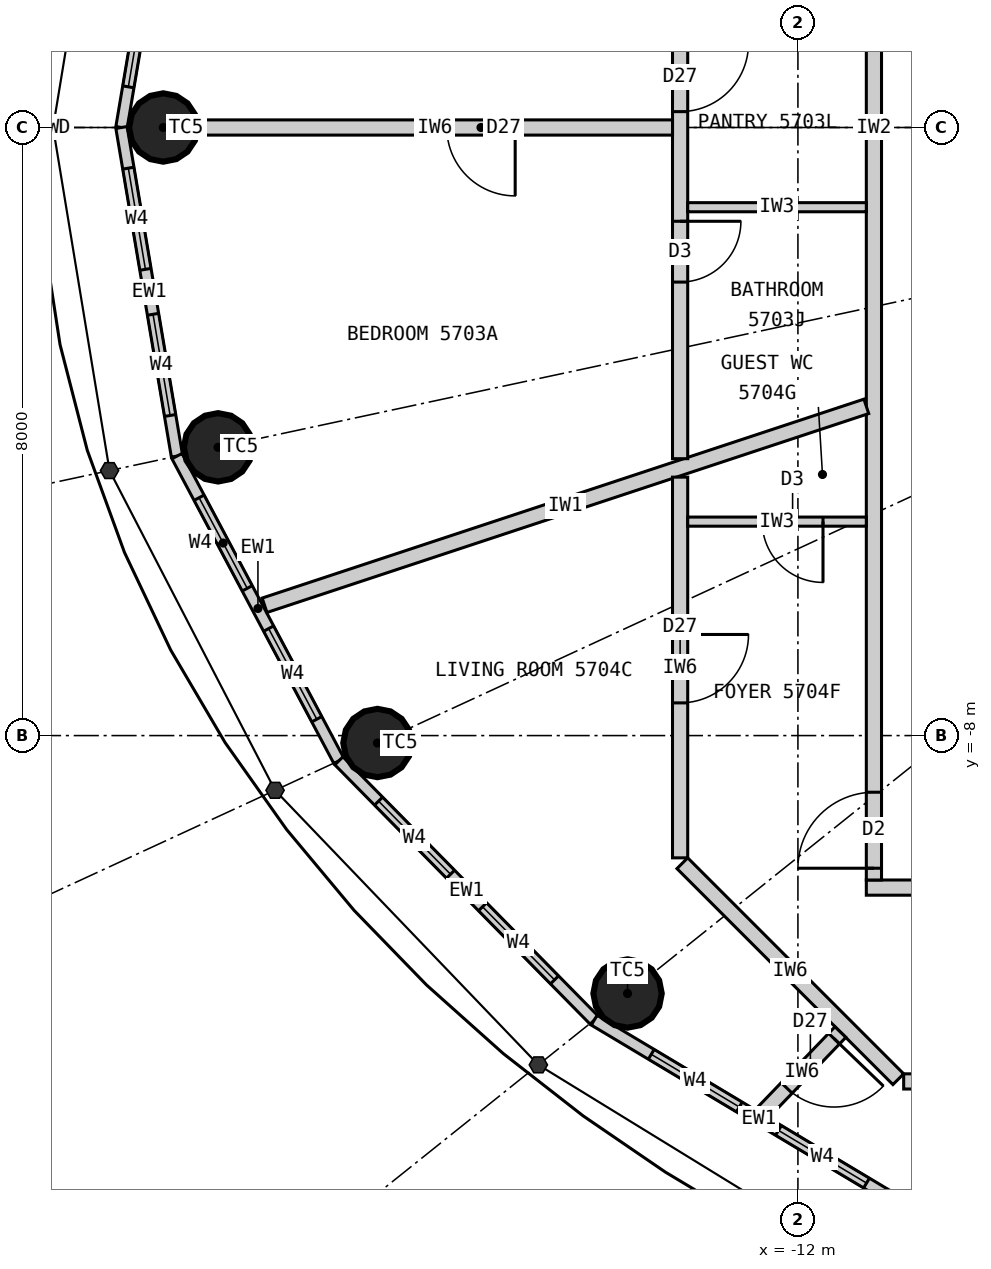
"""IFC4 building model, lengths in metres.
Left out: names, types, materials, properties, quantities, classifications, styles, units other than length and angle.
Written with IfcOpenShell. Run it as: python <this file> out.ifc"""

import sys

from ifc_helpers import new_model, si_unit, direction, frame, frame_2d, origin, origin_2d, place, context, subcontext, project, spatial, rectangle, circle, extrude, element, fill, save


model = new_model("IFC4")
c1 = context("Model", 3, precision=1e-05, world=origin(), true_north=direction((0.0, 1.0)))
c2 = subcontext(c1, "Body", "Model", "MODEL_VIEW")
j1 = project(units=[si_unit("LENGTHUNIT", "METRE"), si_unit("PLANEANGLEUNIT", "RADIAN")], contexts=[c1])
p1 = place(None, origin())
s1 = spatial("IfcSite", under=j1, at=p1, CompositionType="ELEMENT")
p2 = place(p1, origin())
s2 = spatial("IfcBuilding", under=s1, at=p2, CompositionType="ELEMENT")
p3 = place(p2, frame((0.0, 0.0, 212.7)))
s3 = spatial("IfcBuildingStorey", under=s2, at=p3, CompositionType="ELEMENT", Elevation=212.7)
for number, where, z_axis, x_axis in (
    (1, (-20.35, 0.0, 0.0), (0.0, 0.0, 1.0), (1.0, 0.0, 0.0)),
    (2, (-19.629, -4.208, 0.0), (0.0, 0.0, 1.0), (1.0, 0.0, 0.0)),
    (3, (-17.532, -8.098, 0.0), (0.0, 0.0, 1.0), (1.0, 0.0, 0.0)),
    (4, (-14.241, -11.393, 0.0), (0.0, 0.0, 1.0), (1.0, 0.0, 0.0)),
):
    element("IfcColumn", number, at=place(p3, frame(where, z_axis=z_axis, x_axis=x_axis)), inside=s3, PredefinedType="COLUMN", context=c2, shape_type="SweptSolid", body=[
        extrude(circle(Radius=0.45, at=origin_2d()), origin(), (0.0, 0.0, 1.0), 3.3),
    ])
p4 = place(p3, frame((-20.17, 4.323, 0.0), z_axis=(0.0, 0.0, 1.0), x_axis=(-0.166538513568, -0.986034950445, 0.0)))
e5 = element("IfcWall", 5, at=p4, inside=s3, PredefinedType="ELEMENTEDWALL", context=c2, shape_type="SweptSolid", body=[
    extrude(rectangle(XDim=4.385, YDim=0.15, at=frame_2d((2.192, 0.0))), origin(), (0.0, 0.0, 1.0), 3.12),
])
p5 = place(p4, frame((0.542, 0.0, 0.9)))
e6 = element("IfcOpeningElement", 6, at=p5, cuts=e5, PredefinedType="OPENING", context=c2, shape_type="SweptSolid", body=[
    extrude(rectangle(XDim=1.35, YDim=1.9, at=frame_2d((0.675, 0.95))), frame((0.0, 0.085, 0.0), z_axis=(0.0, -1.0, 0.0), x_axis=(1.0, 0.0, 0.0)), (0.0, 0.0, 1.0), 0.17),
])
p6 = place(p4, frame((2.492, 0.0, 0.9)))
e7 = element("IfcOpeningElement", 7, at=p6, cuts=e5, PredefinedType="OPENING", context=c2, shape_type="SweptSolid", body=[
    extrude(rectangle(XDim=1.35, YDim=1.9, at=frame_2d((0.675, 0.95))), frame((0.0, 0.085, 0.0), z_axis=(0.0, -1.0, 0.0), x_axis=(1.0, 0.0, 0.0)), (0.0, 0.0, 1.0), 0.17),
])
p7 = place(p3, frame((-20.9, 0.0, 0.0), z_axis=(0.0, 0.0, 1.0), x_axis=(0.166538513568, -0.986034950445, 0.0)))
e8 = element("IfcWall", 8, at=p7, inside=s3, PredefinedType="ELEMENTEDWALL", context=c2, shape_type="SweptSolid", body=[
    extrude(rectangle(XDim=4.385, YDim=0.15, at=frame_2d((2.192, 0.0))), origin(), (0.0, 0.0, 1.0), 3.12),
])
p8 = place(p7, frame((0.542, 0.0, 0.9)))
e9 = element("IfcOpeningElement", 9, at=p8, cuts=e8, PredefinedType="OPENING", context=c2, shape_type="SweptSolid", body=[
    extrude(rectangle(XDim=1.35, YDim=1.9, at=frame_2d((0.675, 0.95))), frame((0.0, 0.085, 0.0), z_axis=(0.0, -1.0, 0.0), x_axis=(1.0, 0.0, 0.0)), (0.0, 0.0, 1.0), 0.17),
])
p9 = place(p7, frame((2.492, 0.0, 0.9)))
e10 = element("IfcOpeningElement", 10, at=p9, cuts=e8, PredefinedType="OPENING", context=c2, shape_type="SweptSolid", body=[
    extrude(rectangle(XDim=1.35, YDim=1.9, at=frame_2d((0.675, 0.95))), frame((0.0, 0.085, 0.0), z_axis=(0.0, -1.0, 0.0), x_axis=(1.0, 0.0, 0.0)), (0.0, 0.0, 1.0), 0.17),
])
p10 = place(p3, frame((-20.17, -4.323, 0.0), z_axis=(0.0, 0.0, 1.0), x_axis=(0.469256152955, -0.883062094597, 0.0)))
e11 = element("IfcWall", 11, at=p10, inside=s3, PredefinedType="ELEMENTEDWALL", context=c2, shape_type="SweptSolid", body=[
    extrude(rectangle(XDim=4.539, YDim=0.15, at=frame_2d((2.27, 0.0))), origin(), (0.0, 0.0, 1.0), 3.12),
])
p11 = place(p10, frame((0.62, 0.0, 0.9)))
e12 = element("IfcOpeningElement", 12, at=p11, cuts=e11, PredefinedType="OPENING", context=c2, shape_type="SweptSolid", body=[
    extrude(rectangle(XDim=1.35, YDim=1.9, at=frame_2d((0.675, 0.95))), frame((0.0, 0.085, 0.0), z_axis=(0.0, -1.0, 0.0), x_axis=(1.0, 0.0, 0.0)), (0.0, 0.0, 1.0), 0.17),
])
p12 = place(p10, frame((2.57, 0.0, 0.9)))
e13 = element("IfcOpeningElement", 13, at=p12, cuts=e11, PredefinedType="OPENING", context=c2, shape_type="SweptSolid", body=[
    extrude(rectangle(XDim=1.35, YDim=1.9, at=frame_2d((0.675, 0.95))), frame((0.0, 0.085, 0.0), z_axis=(0.0, -1.0, 0.0), x_axis=(1.0, 0.0, 0.0)), (0.0, 0.0, 1.0), 0.17),
])
p13 = place(p3, frame((-18.04, -8.332, 0.0), z_axis=(0.0, 0.0, 1.0), x_axis=(0.701527379618, -0.712642501993, 0.0)))
e14 = element("IfcWall", 14, at=p13, inside=s3, PredefinedType="ELEMENTEDWALL", context=c2, shape_type="SweptSolid", body=[
    extrude(rectangle(XDim=4.788, YDim=0.15, at=frame_2d((2.394, 0.0))), origin(), (0.0, 0.0, 1.0), 3.12),
])
p14 = place(p13, frame((0.744, 0.0, 0.9)))
e15 = element("IfcOpeningElement", 15, at=p14, cuts=e14, PredefinedType="OPENING", context=c2, shape_type="SweptSolid", body=[
    extrude(rectangle(XDim=1.35, YDim=1.9, at=frame_2d((0.675, 0.95))), frame((0.0, 0.085, 0.0), z_axis=(0.0, -1.0, 0.0), x_axis=(1.0, 0.0, 0.0)), (0.0, 0.0, 1.0), 0.17),
])
p15 = place(p13, frame((2.694, 0.0, 0.9)))
e16 = element("IfcOpeningElement", 16, at=p15, cuts=e14, PredefinedType="OPENING", context=c2, shape_type="SweptSolid", body=[
    extrude(rectangle(XDim=1.35, YDim=1.9, at=frame_2d((0.675, 0.95))), frame((0.0, 0.085, 0.0), z_axis=(0.0, -1.0, 0.0), x_axis=(1.0, 0.0, 0.0)), (0.0, 0.0, 1.0), 0.17),
])
p16 = place(p3, frame((-14.68, -11.744, 0.0), z_axis=(0.0, 0.0, 1.0), x_axis=(0.85822150553, -0.513279502265, 0.0)))
e17 = element("IfcWall", 17, at=p16, inside=s3, PredefinedType="ELEMENTEDWALL", context=c2, shape_type="SweptSolid", body=[
    extrude(rectangle(XDim=5.05, YDim=0.15, at=frame_2d((2.525, 0.0))), origin(), (0.0, 0.0, 1.0), 3.12),
])
p17 = place(p16, frame((0.875, 0.0, 0.9)))
e18 = element("IfcOpeningElement", 18, at=p17, cuts=e17, PredefinedType="OPENING", context=c2, shape_type="SweptSolid", body=[
    extrude(rectangle(XDim=1.35, YDim=1.9, at=frame_2d((0.675, 0.95))), frame((0.0, 0.085, 0.0), z_axis=(0.0, -1.0, 0.0), x_axis=(1.0, 0.0, 0.0)), (0.0, 0.0, 1.0), 0.17),
])
p18 = place(p16, frame((2.825, 0.0, 0.9)))
e19 = element("IfcOpeningElement", 19, at=p18, cuts=e17, PredefinedType="OPENING", context=c2, shape_type="SweptSolid", body=[
    extrude(rectangle(XDim=1.35, YDim=1.9, at=frame_2d((0.675, 0.95))), frame((0.0, 0.085, 0.0), z_axis=(0.0, -1.0, 0.0), x_axis=(1.0, 0.0, 0.0)), (0.0, 0.0, 1.0), 0.17),
])
p19 = place(p3, frame((11.1, -10.0, 0.0), z_axis=(0.0, 0.0, 1.0), x_axis=(-1.0, 0.0, 0.0)))
e20 = element("IfcWall", 20, at=p19, inside=s3, PredefinedType="PARTITIONING", context=c2, shape_type="SweptSolid", body=[
    extrude(rectangle(XDim=22.2, YDim=0.2, at=frame_2d((11.1, 0.0))), origin(), (0.0, 0.0, 1.0), 3.12),
])
p20 = place(p19, frame((11.36, 0.0, 0.0)))
e21 = element("IfcOpeningElement", 21, at=p20, cuts=e20, PredefinedType="OPENING", context=c2, shape_type="SweptSolid", body=[
    extrude(rectangle(XDim=1.0, YDim=2.2, at=frame_2d((0.5, 1.1))), frame((0.0, 0.11, 0.0), z_axis=(0.0, -1.0, 0.0), x_axis=(1.0, 0.0, 0.0)), (0.0, 0.0, 1.0), 0.22),
])
p21 = place(p19, frame((0.595, 0.0, 0.0)))
e22 = element("IfcOpeningElement", 22, at=p21, cuts=e20, PredefinedType="OPENING", context=c2, shape_type="SweptSolid", body=[
    extrude(rectangle(XDim=1.0, YDim=2.2, at=frame_2d((0.5, 1.1))), frame((0.0, 0.11, 0.0), z_axis=(0.0, -1.0, 0.0), x_axis=(1.0, 0.0, 0.0)), (0.0, 0.0, 1.0), 0.22),
])
p22 = place(p3, frame((-11.0, 9.9, 0.0), z_axis=(0.0, 0.0, 1.0), x_axis=(0.0, -1.0, 0.0)))
e23 = element("IfcWall", 23, at=p22, inside=s3, PredefinedType="PARTITIONING", context=c2, shape_type="SweptSolid", body=[
    extrude(rectangle(XDim=19.8, YDim=0.2, at=frame_2d((9.9, 0.0))), origin(), (0.0, 0.0, 1.0), 3.12),
])
p23 = place(p22, frame((5.075, 0.0, 0.0)))
e24 = element("IfcOpeningElement", 24, at=p23, cuts=e23, PredefinedType="OPENING", context=c2, shape_type="SweptSolid", body=[
    extrude(rectangle(XDim=1.0, YDim=2.2, at=frame_2d((0.5, 1.1))), frame((0.0, 0.11, 0.0), z_axis=(0.0, -1.0, 0.0), x_axis=(1.0, 0.0, 0.0)), (0.0, 0.0, 1.0), 0.22),
])
p24 = place(p22, frame((18.645, 0.0, 0.0)))
e25 = element("IfcOpeningElement", 25, at=p24, cuts=e23, PredefinedType="OPENING", context=c2, shape_type="SweptSolid", body=[
    extrude(rectangle(XDim=1.0, YDim=2.2, at=frame_2d((0.5, 1.1))), frame((0.0, 0.11, 0.0), z_axis=(0.0, -1.0, 0.0), x_axis=(1.0, 0.0, 0.0)), (0.0, 0.0, 1.0), 0.22),
])
p25 = place(p3, frame((-11.1, -3.669, 0.0), z_axis=(0.0, 0.0, 1.0), x_axis=(-0.949476668397, -0.313837627079, 0.0)))
e26 = element("IfcWall", 26, at=p25, inside=s3, PredefinedType="PARTITIONING", context=c2, shape_type="SweptSolid", body=[
    extrude(rectangle(XDim=8.339, YDim=0.2, at=frame_2d((4.169, 0.0))), origin(), (0.0, 0.0, 1.0), 3.12),
])
p26 = place(p3, frame((-13.55, 8.139, 0.0), z_axis=(0.0, 0.0, 1.0), x_axis=(0.0, -1.0, 0.0)))
e27 = element("IfcWall", 27, at=p26, inside=s3, PredefinedType="PARTITIONING", context=c2, shape_type="SweptSolid", body=[
    extrude(rectangle(XDim=12.496, YDim=0.2, at=frame_2d((6.248, 0.0))), origin(), (0.0, 0.0, 1.0), 3.12),
])
p27 = place(p26, frame((7.031, 0.0, 0.0)))
e28 = element("IfcOpeningElement", 28, at=p27, cuts=e27, PredefinedType="OPENING", context=c2, shape_type="SweptSolid", body=[
    extrude(rectangle(XDim=0.9, YDim=2.1, at=frame_2d((0.45, 1.05))), frame((0.0, 0.11, 0.0), z_axis=(0.0, -1.0, 0.0), x_axis=(1.0, 0.0, 0.0)), (0.0, 0.0, 1.0), 0.22),
])
p28 = place(p26, frame((9.373, 0.0, 0.0)))
e29 = element("IfcOpeningElement", 29, at=p28, cuts=e27, PredefinedType="OPENING", context=c2, shape_type="SweptSolid", body=[
    extrude(rectangle(XDim=0.8, YDim=2.1, at=frame_2d((0.4, 1.05))), frame((0.0, 0.11, 0.0), z_axis=(0.0, -1.0, 0.0), x_axis=(1.0, 0.0, 0.0)), (0.0, 0.0, 1.0), 0.22),
])
p29 = place(p26, frame((3.789, 0.0, 0.0)))
e30 = element("IfcOpeningElement", 30, at=p29, cuts=e27, PredefinedType="OPENING", context=c2, shape_type="SweptSolid", body=[
    extrude(rectangle(XDim=0.9, YDim=2.1, at=frame_2d((0.45, 1.05))), frame((0.0, 0.11, 0.0), z_axis=(0.0, -1.0, 0.0), x_axis=(1.0, 0.0, 0.0)), (0.0, 0.0, 1.0), 0.22),
])
p30 = place(p3, frame((-13.65, 0.0, 0.0), z_axis=(0.0, 0.0, 1.0), x_axis=(-1.0, 0.0, 0.0)))
e31 = element("IfcWall", 31, at=p30, inside=s3, PredefinedType="PARTITIONING", context=c2, shape_type="SweptSolid", body=[
    extrude(rectangle(XDim=6.25, YDim=0.2, at=frame_2d((3.125, 0.0))), origin(), (0.0, 0.0, 1.0), 2.37),
])
p31 = place(p30, frame((2.07, 0.0, 0.0)))
e32 = element("IfcOpeningElement", 32, at=p31, cuts=e31, PredefinedType="OPENING", context=c2, shape_type="SweptSolid", body=[
    extrude(rectangle(XDim=0.9, YDim=2.1, at=frame_2d((0.45, 1.05))), frame((0.0, 0.11, 0.0), z_axis=(0.0, -1.0, 0.0), x_axis=(1.0, 0.0, 0.0)), (0.0, 0.0, 1.0), 0.22),
])
p32 = place(p3, frame((-11.1, -1.049, 0.0), z_axis=(0.0, 0.0, 1.0), x_axis=(-1.0, 0.0, 0.0)))
e33 = element("IfcWall", 33, at=p32, inside=s3, PredefinedType="PARTITIONING", context=c2, shape_type="SweptSolid", body=[
    extrude(rectangle(XDim=2.35, YDim=0.12, at=frame_2d((1.175, 0.0))), origin(), (0.0, 0.0, 1.0), 3.12),
])
p33 = place(p3, frame((-13.55, -4.6, 0.0), z_axis=(0.0, 0.0, 1.0), x_axis=(0.0, -1.0, 0.0)))
e34 = element("IfcWall", 34, at=p33, inside=s3, PredefinedType="PARTITIONING", context=c2, shape_type="SweptSolid", body=[
    extrude(rectangle(XDim=5.009, YDim=0.2, at=frame_2d((2.504, 0.0))), origin(), (0.0, 0.0, 1.0), 3.12),
])
p34 = place(p33, frame((2.07, 0.0, 0.0)))
e35 = element("IfcOpeningElement", 35, at=p34, cuts=e34, PredefinedType="OPENING", context=c2, shape_type="SweptSolid", body=[
    extrude(rectangle(XDim=0.9, YDim=2.1, at=frame_2d((0.45, 1.05))), frame((0.0, 0.11, 0.0), z_axis=(0.0, -1.0, 0.0), x_axis=(1.0, 0.0, 0.0)), (0.0, 0.0, 1.0), 0.22),
])
p35 = place(p3, frame((-13.521, -9.679, 0.0), z_axis=(0.0, 0.0, 1.0), x_axis=(0.707106781187, -0.707106781187, 0.0)))
e36 = element("IfcWall", 36, at=p35, inside=s3, PredefinedType="PARTITIONING", context=c2, shape_type="SweptSolid", body=[
    extrude(rectangle(XDim=4.019, YDim=0.2, at=frame_2d((2.009, 0.0))), origin(), (0.0, 0.0, 1.0), 3.12),
])
p36 = place(p3, frame((-10.609, -12.55, 0.0), z_axis=(0.0, 0.0, 1.0), x_axis=(1.0, 0.0, 0.0)))
e37 = element("IfcWall", 37, at=p36, inside=s3, PredefinedType="PARTITIONING", context=c2, shape_type="SweptSolid", body=[
    extrude(rectangle(XDim=6.284, YDim=0.2, at=frame_2d((3.142, 0.0))), origin(), (0.0, 0.0, 1.0), 3.12),
])
p37 = place(p36, frame((4.944, 0.0, 0.0)))
e38 = element("IfcOpeningElement", 38, at=p37, cuts=e37, PredefinedType="OPENING", context=c2, shape_type="SweptSolid", body=[
    extrude(rectangle(XDim=0.8, YDim=2.1, at=frame_2d((0.4, 1.05))), frame((0.0, 0.11, 0.0), z_axis=(0.0, -1.0, 0.0), x_axis=(1.0, 0.0, 0.0)), (0.0, 0.0, 1.0), 0.22),
])
p38 = place(p3, frame((-11.441, -11.9, 0.0), z_axis=(0.0, 0.0, 1.0), x_axis=(-0.692958717259, -0.720977264672, 0.0)))
e39 = element("IfcWall", 39, at=p38, inside=s3, PredefinedType="PARTITIONING", context=c2, shape_type="SweptSolid", body=[
    extrude(rectangle(XDim=1.464, YDim=0.2, at=frame_2d((0.732, 0.0))), origin(), (0.0, 0.0, 1.0), 3.12),
])
p39 = place(p38, frame((0.12, 0.0, 0.0)))
e40 = element("IfcOpeningElement", 40, at=p39, cuts=e39, PredefinedType="OPENING", context=c2, shape_type="SweptSolid", body=[
    extrude(rectangle(XDim=0.9, YDim=2.1, at=frame_2d((0.45, 1.05))), frame((0.0, 0.11, 0.0), z_axis=(0.0, -1.0, 0.0), x_axis=(1.0, 0.0, 0.0)), (0.0, 0.0, 1.0), 0.22),
])
p40 = place(p3, frame((-11.1, -5.185, 0.0), z_axis=(0.0, 0.0, 1.0), x_axis=(-1.0, 0.0, 0.0)))
e41 = element("IfcWall", 41, at=p40, inside=s3, PredefinedType="PARTITIONING", context=c2, shape_type="SweptSolid", body=[
    extrude(rectangle(XDim=2.35, YDim=0.12, at=frame_2d((1.175, 0.0))), origin(), (0.0, 0.0, 1.0), 3.12),
])
p41 = place(p40, frame((0.57, 0.0, 0.0)))
e42 = element("IfcOpeningElement", 42, at=p41, cuts=e41, PredefinedType="OPENING", context=c2, shape_type="SweptSolid", body=[
    extrude(rectangle(XDim=0.8, YDim=2.1, at=frame_2d((0.4, 1.05))), frame((0.0, 0.07, 0.0), z_axis=(0.0, -1.0, 0.0), x_axis=(1.0, 0.0, 0.0)), (0.0, 0.0, 1.0), 0.14),
])
p42 = place(p6, origin())
e43 = element("IfcWindow", 43, at=p42, inside=s3, PartitioningType="SINGLE_PANEL", PredefinedType="WINDOW", context=c2, shape_type="SweptSolid", body=[
    extrude(rectangle(XDim=1.35, YDim=1.9, at=frame_2d((0.675, 0.95))), frame((0.0, 0.03, 0.0), z_axis=(0.0, -1.0, 0.0), x_axis=(1.0, 0.0, 0.0)), (0.0, 0.0, 1.0), 0.06),
])
fill(e7, e43)
p43 = place(p8, origin())
e44 = element("IfcWindow", 44, at=p43, inside=s3, PartitioningType="SINGLE_PANEL", PredefinedType="WINDOW", context=c2, shape_type="SweptSolid", body=[
    extrude(rectangle(XDim=1.35, YDim=1.9, at=frame_2d((0.675, 0.95))), frame((0.0, 0.03, 0.0), z_axis=(0.0, -1.0, 0.0), x_axis=(1.0, 0.0, 0.0)), (0.0, 0.0, 1.0), 0.06),
])
fill(e9, e44)
p44 = place(p9, origin())
e45 = element("IfcWindow", 45, at=p44, inside=s3, PartitioningType="SINGLE_PANEL", PredefinedType="WINDOW", context=c2, shape_type="SweptSolid", body=[
    extrude(rectangle(XDim=1.35, YDim=1.9, at=frame_2d((0.675, 0.95))), frame((0.0, 0.03, 0.0), z_axis=(0.0, -1.0, 0.0), x_axis=(1.0, 0.0, 0.0)), (0.0, 0.0, 1.0), 0.06),
])
fill(e10, e45)
p45 = place(p11, origin())
e46 = element("IfcWindow", 46, at=p45, inside=s3, PartitioningType="SINGLE_PANEL", PredefinedType="WINDOW", context=c2, shape_type="SweptSolid", body=[
    extrude(rectangle(XDim=1.35, YDim=1.9, at=frame_2d((0.675, 0.95))), frame((0.0, 0.03, 0.0), z_axis=(0.0, -1.0, 0.0), x_axis=(1.0, 0.0, 0.0)), (0.0, 0.0, 1.0), 0.06),
])
fill(e12, e46)
p46 = place(p12, origin())
e47 = element("IfcWindow", 47, at=p46, inside=s3, PartitioningType="SINGLE_PANEL", PredefinedType="WINDOW", context=c2, shape_type="SweptSolid", body=[
    extrude(rectangle(XDim=1.35, YDim=1.9, at=frame_2d((0.675, 0.95))), frame((0.0, 0.03, 0.0), z_axis=(0.0, -1.0, 0.0), x_axis=(1.0, 0.0, 0.0)), (0.0, 0.0, 1.0), 0.06),
])
fill(e13, e47)
p47 = place(p14, origin())
e48 = element("IfcWindow", 48, at=p47, inside=s3, PartitioningType="SINGLE_PANEL", PredefinedType="WINDOW", context=c2, shape_type="SweptSolid", body=[
    extrude(rectangle(XDim=1.35, YDim=1.9, at=frame_2d((0.675, 0.95))), frame((0.0, 0.03, 0.0), z_axis=(0.0, -1.0, 0.0), x_axis=(1.0, 0.0, 0.0)), (0.0, 0.0, 1.0), 0.06),
])
fill(e15, e48)
p48 = place(p15, origin())
e49 = element("IfcWindow", 49, at=p48, inside=s3, PartitioningType="SINGLE_PANEL", PredefinedType="WINDOW", context=c2, shape_type="SweptSolid", body=[
    extrude(rectangle(XDim=1.35, YDim=1.9, at=frame_2d((0.675, 0.95))), frame((0.0, 0.03, 0.0), z_axis=(0.0, -1.0, 0.0), x_axis=(1.0, 0.0, 0.0)), (0.0, 0.0, 1.0), 0.06),
])
fill(e16, e49)
p49 = place(p17, origin())
e50 = element("IfcWindow", 50, at=p49, inside=s3, PartitioningType="SINGLE_PANEL", PredefinedType="WINDOW", context=c2, shape_type="SweptSolid", body=[
    extrude(rectangle(XDim=1.35, YDim=1.9, at=frame_2d((0.675, 0.95))), frame((0.0, 0.03, 0.0), z_axis=(0.0, -1.0, 0.0), x_axis=(1.0, 0.0, 0.0)), (0.0, 0.0, 1.0), 0.06),
])
fill(e18, e50)
p50 = place(p18, origin())
e51 = element("IfcWindow", 51, at=p50, inside=s3, PartitioningType="SINGLE_PANEL", PredefinedType="WINDOW", context=c2, shape_type="SweptSolid", body=[
    extrude(rectangle(XDim=1.35, YDim=1.9, at=frame_2d((0.675, 0.95))), frame((0.0, 0.03, 0.0), z_axis=(0.0, -1.0, 0.0), x_axis=(1.0, 0.0, 0.0)), (0.0, 0.0, 1.0), 0.06),
])
fill(e19, e51)
p51 = place(p27, origin())
e52 = element("IfcDoor", 52, at=p51, inside=s3, OperationType="SINGLE_SWING_LEFT", PredefinedType="DOOR", context=c2, shape_type="SweptSolid", body=[
    extrude(rectangle(XDim=0.9, YDim=2.1, at=frame_2d((0.45, 1.05))), frame((0.0, 0.025, 0.0), z_axis=(0.0, -1.0, 0.0), x_axis=(1.0, 0.0, 0.0)), (0.0, 0.0, 1.0), 0.05),
])
fill(e28, e52)
p52 = place(p28, origin())
e53 = element("IfcDoor", 53, at=p52, inside=s3, OperationType="SINGLE_SWING_LEFT", PredefinedType="DOOR", context=c2, shape_type="SweptSolid", body=[
    extrude(rectangle(XDim=0.8, YDim=2.1, at=frame_2d((0.4, 1.05))), frame((0.0, 0.025, 0.0), z_axis=(0.0, -1.0, 0.0), x_axis=(1.0, 0.0, 0.0)), (0.0, 0.0, 1.0), 0.05),
])
fill(e29, e53)
p53 = place(p31, origin())
e54 = element("IfcDoor", 54, at=p53, inside=s3, OperationType="SINGLE_SWING_LEFT", PredefinedType="DOOR", context=c2, shape_type="SweptSolid", body=[
    extrude(rectangle(XDim=0.9, YDim=2.1, at=frame_2d((0.45, 1.05))), frame((0.0, 0.025, 0.0), z_axis=(0.0, -1.0, 0.0), x_axis=(1.0, 0.0, 0.0)), (0.0, 0.0, 1.0), 0.05),
])
fill(e32, e54)
p54 = place(p24, origin())
e55 = element("IfcDoor", 55, at=p54, inside=s3, OperationType="SINGLE_SWING_RIGHT", PredefinedType="DOOR", context=c2, shape_type="SweptSolid", body=[
    extrude(rectangle(XDim=1.0, YDim=2.2, at=frame_2d((0.5, 1.1))), frame((0.0, 0.025, 0.0), z_axis=(0.0, -1.0, 0.0), x_axis=(1.0, 0.0, 0.0)), (0.0, 0.0, 1.0), 0.05),
])
fill(e25, e55)
p55 = place(p41, origin())
e56 = element("IfcDoor", 56, at=p55, inside=s3, OperationType="SINGLE_SWING_LEFT", PredefinedType="DOOR", context=c2, shape_type="SweptSolid", body=[
    extrude(rectangle(XDim=0.8, YDim=2.1, at=frame_2d((0.4, 1.05))), frame((0.0, 0.025, 0.0), z_axis=(0.0, -1.0, 0.0), x_axis=(1.0, 0.0, 0.0)), (0.0, 0.0, 1.0), 0.05),
])
fill(e42, e56)
p56 = place(p34, origin())
e57 = element("IfcDoor", 57, at=p56, inside=s3, OperationType="SINGLE_SWING_LEFT", PredefinedType="DOOR", context=c2, shape_type="SweptSolid", body=[
    extrude(rectangle(XDim=0.9, YDim=2.1, at=frame_2d((0.45, 1.05))), frame((0.0, 0.025, 0.0), z_axis=(0.0, -1.0, 0.0), x_axis=(1.0, 0.0, 0.0)), (0.0, 0.0, 1.0), 0.05),
])
fill(e35, e57)
p57 = place(p39, origin())
e58 = element("IfcDoor", 58, at=p57, inside=s3, OperationType="SINGLE_SWING_LEFT", PredefinedType="DOOR", context=c2, shape_type="SweptSolid", body=[
    extrude(rectangle(XDim=0.9, YDim=2.1, at=frame_2d((0.45, 1.05))), frame((0.0, 0.025, 0.0), z_axis=(0.0, -1.0, 0.0), x_axis=(1.0, 0.0, 0.0)), (0.0, 0.0, 1.0), 0.05),
])
fill(e40, e58)
save(model, sys.argv[1])
